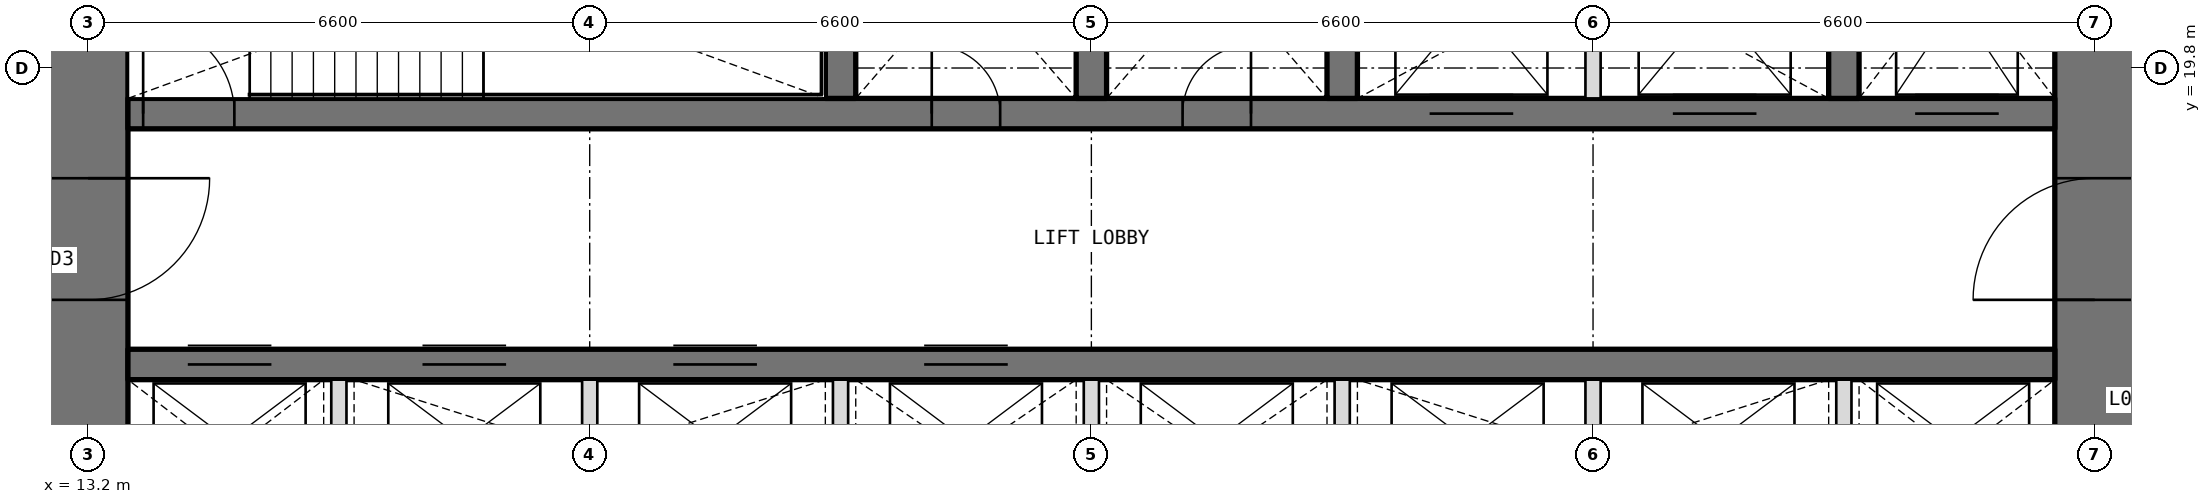
"""IFC4 building model, lengths in metres.
Left out: names, types, materials, properties, quantities, classifications, styles, units other than length and angle.
Written with IfcOpenShell. Run it as: python <this file> out.ifc"""

import sys

from ifc_helpers import new_model, si_unit, direction, frame, frame_2d, origin, place, context, subcontext, project, spatial, rectangle, extrude, element, fill, save


model = new_model("IFC4")
c1 = context("Model", 3, precision=1e-05, world=origin(), true_north=direction((0.0, 1.0)))
c2 = subcontext(c1, "Body", "Model", "MODEL_VIEW")
j1 = project(units=[si_unit("LENGTHUNIT", "METRE"), si_unit("PLANEANGLEUNIT", "RADIAN")], contexts=[c1])
p1 = place(None, origin())
s1 = spatial("IfcSite", under=j1, at=p1, CompositionType="ELEMENT")
p2 = place(p1, origin())
s2 = spatial("IfcBuilding", under=s1, at=p2, CompositionType="ELEMENT")
p3 = place(p2, frame((0.0, 0.0, 17.1)))
s3 = spatial("IfcBuildingStorey", under=s2, at=p3, CompositionType="ELEMENT", Elevation=17.1)
p4 = place(p3, frame((39.6, 13.725, 0.0), z_axis=(0.0, 0.0, 1.0), x_axis=(0.0, 1.0, 0.0)))
e1 = element("IfcWall", 1, at=p4, inside=s3, PredefinedType="SHEAR", context=c2, shape_type="SweptSolid", body=[
    extrude(rectangle(XDim=18.75, YDim=1.05, at=frame_2d((9.375, 0.0))), origin(), (0.0, 0.0, 1.0), 4.2),
])
p5 = place(p4, frame((3.025, 0.0, 0.0)))
e2 = element("IfcOpeningElement", 2, at=p5, cuts=e1, PredefinedType="OPENING", context=c2, shape_type="SweptSolid", body=[
    extrude(rectangle(XDim=1.6, YDim=2.1, at=frame_2d((0.8, 1.05))), frame((0.0, 0.535, 0.0), z_axis=(0.0, -1.0, 0.0), x_axis=(1.0, 0.0, 0.0)), (0.0, 0.0, 1.0), 1.07),
])
p6 = place(p4, frame((13.825, 0.0, 0.0)))
e3 = element("IfcOpeningElement", 3, at=p6, cuts=e1, PredefinedType="OPENING", context=c2, shape_type="SweptSolid", body=[
    extrude(rectangle(XDim=1.6, YDim=2.1, at=frame_2d((0.8, 1.05))), frame((0.0, 0.535, 0.0), z_axis=(0.0, -1.0, 0.0), x_axis=(1.0, 0.0, 0.0)), (0.0, 0.0, 1.0), 1.07),
])
p7 = place(p3, frame((13.2, 32.475, 0.0), z_axis=(0.0, 0.0, 1.0), x_axis=(0.0, -1.0, 0.0)))
e4 = element("IfcWall", 4, at=p7, inside=s3, PredefinedType="SHEAR", context=c2, shape_type="SweptSolid", body=[
    extrude(rectangle(XDim=18.75, YDim=1.05, at=frame_2d((9.375, 0.0))), origin(), (0.0, 0.0, 1.0), 4.2),
])
p8 = place(p7, frame((14.125, 0.0, 0.0)))
e5 = element("IfcOpeningElement", 5, at=p8, cuts=e4, PredefinedType="OPENING", context=c2, shape_type="SweptSolid", body=[
    extrude(rectangle(XDim=1.6, YDim=2.1, at=frame_2d((0.8, 1.05))), frame((0.0, 0.535, 0.0), z_axis=(0.0, -1.0, 0.0), x_axis=(1.0, 0.0, 0.0)), (0.0, 0.0, 1.0), 1.07),
])
p9 = place(p7, frame((3.325, 0.0, 0.0)))
e6 = element("IfcOpeningElement", 6, at=p9, cuts=e4, PredefinedType="OPENING", context=c2, shape_type="SweptSolid", body=[
    extrude(rectangle(XDim=1.6, YDim=2.1, at=frame_2d((0.8, 1.05))), frame((0.0, 0.535, 0.0), z_axis=(0.0, -1.0, 0.0), x_axis=(1.0, 0.0, 0.0)), (0.0, 0.0, 1.0), 1.07),
])
p10 = place(p3, frame((13.725, 15.9, 0.0), z_axis=(0.0, 0.0, 1.0), x_axis=(1.0, 0.0, 0.0)))
e7 = element("IfcWall", 7, at=p10, inside=s3, PredefinedType="SHEAR", context=c2, shape_type="SweptSolid", body=[
    extrude(rectangle(XDim=25.35, YDim=0.4, at=frame_2d((12.675, 0.0))), origin(), (0.0, 0.0, 1.0), 4.2),
])
p11 = place(p10, frame((0.788, 0.0, 0.0)))
e8 = element("IfcOpeningElement", 8, at=p11, cuts=e7, PredefinedType="OPENING", context=c2, shape_type="SweptSolid", body=[
    extrude(rectangle(XDim=1.1, YDim=2.1, at=frame_2d((0.55, 1.05))), frame((0.0, 0.21, 0.0), z_axis=(0.0, -1.0, 0.0), x_axis=(1.0, 0.0, 0.0)), (0.0, 0.0, 1.0), 0.42),
])
p12 = place(p10, frame((3.875, 0.0, 0.0)))
e9 = element("IfcOpeningElement", 9, at=p12, cuts=e7, PredefinedType="OPENING", context=c2, shape_type="SweptSolid", body=[
    extrude(rectangle(XDim=1.1, YDim=2.1, at=frame_2d((0.55, 1.05))), frame((0.0, 0.21, 0.0), z_axis=(0.0, -1.0, 0.0), x_axis=(1.0, 0.0, 0.0)), (0.0, 0.0, 1.0), 0.42),
])
p13 = place(p10, frame((7.175, 0.0, 0.0)))
e10 = element("IfcOpeningElement", 10, at=p13, cuts=e7, PredefinedType="OPENING", context=c2, shape_type="SweptSolid", body=[
    extrude(rectangle(XDim=1.1, YDim=2.1, at=frame_2d((0.55, 1.05))), frame((0.0, 0.21, 0.0), z_axis=(0.0, -1.0, 0.0), x_axis=(1.0, 0.0, 0.0)), (0.0, 0.0, 1.0), 0.42),
])
p14 = place(p10, frame((10.475, 0.0, 0.0)))
e11 = element("IfcOpeningElement", 11, at=p14, cuts=e7, PredefinedType="OPENING", context=c2, shape_type="SweptSolid", body=[
    extrude(rectangle(XDim=1.1, YDim=2.1, at=frame_2d((0.55, 1.05))), frame((0.0, 0.21, 0.0), z_axis=(0.0, -1.0, 0.0), x_axis=(1.0, 0.0, 0.0)), (0.0, 0.0, 1.0), 0.42),
])
p15 = place(p3, frame((13.725, 19.2, 0.0), z_axis=(0.0, 0.0, 1.0), x_axis=(1.0, 0.0, 0.0)))
e12 = element("IfcWall", 12, at=p15, inside=s3, PredefinedType="SHEAR", context=c2, shape_type="SweptSolid", body=[
    extrude(rectangle(XDim=25.35, YDim=0.4, at=frame_2d((12.675, 0.0))), origin(), (0.0, 0.0, 1.0), 4.2),
])
p16 = place(p15, frame((10.575, 0.0, 0.0)))
e13 = element("IfcOpeningElement", 13, at=p16, cuts=e12, PredefinedType="OPENING", context=c2, shape_type="SweptSolid", body=[
    extrude(rectangle(XDim=0.9, YDim=2.1, at=frame_2d((0.45, 1.05))), frame((0.0, 0.21, 0.0), z_axis=(0.0, -1.0, 0.0), x_axis=(1.0, 0.0, 0.0)), (0.0, 0.0, 1.0), 0.42),
])
p17 = place(p15, frame((13.875, 0.0, 0.0)))
e14 = element("IfcOpeningElement", 14, at=p17, cuts=e12, PredefinedType="OPENING", context=c2, shape_type="SweptSolid", body=[
    extrude(rectangle(XDim=0.9, YDim=2.1, at=frame_2d((0.45, 1.05))), frame((0.0, 0.21, 0.0), z_axis=(0.0, -1.0, 0.0), x_axis=(1.0, 0.0, 0.0)), (0.0, 0.0, 1.0), 0.42),
])
p18 = place(p15, frame((0.2, 0.0, 0.0)))
e15 = element("IfcOpeningElement", 15, at=p18, cuts=e12, PredefinedType="OPENING", context=c2, shape_type="SweptSolid", body=[
    extrude(rectangle(XDim=1.2, YDim=2.1, at=frame_2d((0.6, 1.05))), frame((0.0, 0.21, 0.0), z_axis=(0.0, -1.0, 0.0), x_axis=(1.0, 0.0, 0.0)), (0.0, 0.0, 1.0), 0.42),
])
p19 = place(p15, frame((23.512, 0.0, 0.0)))
e16 = element("IfcOpeningElement", 16, at=p19, cuts=e12, PredefinedType="OPENING", context=c2, shape_type="SweptSolid", body=[
    extrude(rectangle(XDim=1.1, YDim=2.1, at=frame_2d((0.55, 1.05))), frame((0.0, 0.21, 0.0), z_axis=(0.0, -1.0, 0.0), x_axis=(1.0, 0.0, 0.0)), (0.0, 0.0, 1.0), 0.42),
])
p20 = place(p15, frame((17.125, 0.0, 0.0)))
e17 = element("IfcOpeningElement", 17, at=p20, cuts=e12, PredefinedType="OPENING", context=c2, shape_type="SweptSolid", body=[
    extrude(rectangle(XDim=1.1, YDim=2.1, at=frame_2d((0.55, 1.05))), frame((0.0, 0.21, 0.0), z_axis=(0.0, -1.0, 0.0), x_axis=(1.0, 0.0, 0.0)), (0.0, 0.0, 1.0), 0.42),
])
p21 = place(p15, frame((20.325, 0.0, 0.0)))
e18 = element("IfcOpeningElement", 18, at=p21, cuts=e12, PredefinedType="OPENING", context=c2, shape_type="SweptSolid", body=[
    extrude(rectangle(XDim=1.1, YDim=2.1, at=frame_2d((0.55, 1.05))), frame((0.0, 0.21, 0.0), z_axis=(0.0, -1.0, 0.0), x_axis=(1.0, 0.0, 0.0)), (0.0, 0.0, 1.0), 0.42),
])
for number, where, z_axis, x_axis in (
    (19, (23.1, 19.4, 0.0), (0.0, 0.0, 1.0), (0.0, 1.0, 0.0)),
    (20, (26.4, 19.4, 0.0), (0.0, 0.0, 1.0), (0.0, 1.0, 0.0)),
    (21, (29.7, 19.4, 0.0), (0.0, 0.0, 1.0), (0.0, 1.0, 0.0)),
    (22, (36.3, 19.4, 0.0), (0.0, 0.0, 1.0), (0.0, 1.0, 0.0)),
):
    element("IfcWall", number, at=place(p3, frame(where, z_axis=z_axis, x_axis=x_axis)), inside=s3, PredefinedType="SHEAR", context=c2, shape_type="SweptSolid", body=[
        extrude(rectangle(XDim=3.35, YDim=0.4, at=frame_2d((1.675, 0.0))), origin(), (0.0, 0.0, 1.0), 4.2),
    ])
for number, where, z_axis, x_axis in (
    (23, (16.5, 13.725, 0.0), (0.0, 0.0, 1.0), (0.0, 1.0, 0.0)),
    (24, (19.8, 13.725, 0.0), (0.0, 0.0, 1.0), (0.0, 1.0, 0.0)),
    (25, (23.1, 13.725, 0.0), (0.0, 0.0, 1.0), (0.0, 1.0, 0.0)),
    (26, (26.4, 13.725, 0.0), (0.0, 0.0, 1.0), (0.0, 1.0, 0.0)),
    (27, (29.7, 13.725, 0.0), (0.0, 0.0, 1.0), (0.0, 1.0, 0.0)),
    (28, (33.0, 13.725, 0.0), (0.0, 0.0, 1.0), (0.0, 1.0, 0.0)),
    (29, (36.3, 13.725, 0.0), (0.0, 0.0, 1.0), (0.0, 1.0, 0.0)),
):
    element("IfcWall", number, at=place(p3, frame(where, z_axis=z_axis, x_axis=x_axis)), inside=s3, PredefinedType="PARTITIONING", context=c2, shape_type="SweptSolid", body=[
        extrude(rectangle(XDim=1.975, YDim=0.2, at=frame_2d((0.987, 0.0))), origin(), (0.0, 0.0, 1.0), 4.2),
    ])
p22 = place(p3, frame((33.0, 19.4, 0.0), z_axis=(0.0, 0.0, 1.0), x_axis=(0.0, 1.0, 0.0)))
e30 = element("IfcWall", 30, at=p22, inside=s3, PredefinedType="PARTITIONING", context=c2, shape_type="SweptSolid", body=[
    extrude(rectangle(XDim=3.35, YDim=0.2, at=frame_2d((1.675, 0.0))), origin(), (0.0, 0.0, 1.0), 4.2),
])
p23 = place(p16, origin())
e31 = element("IfcDoor", 31, at=p23, inside=s3, OperationType="SINGLE_SWING_LEFT", PredefinedType="DOOR", context=c2, shape_type="SweptSolid", body=[
    extrude(rectangle(XDim=0.9, YDim=2.1, at=frame_2d((0.45, 1.05))), frame((0.0, 0.025, 0.0), z_axis=(0.0, -1.0, 0.0), x_axis=(1.0, 0.0, 0.0)), (0.0, 0.0, 1.0), 0.05),
])
fill(e13, e31)
p24 = place(p17, origin())
e32 = element("IfcDoor", 32, at=p24, inside=s3, OperationType="SINGLE_SWING_RIGHT", PredefinedType="DOOR", context=c2, shape_type="SweptSolid", body=[
    extrude(rectangle(XDim=0.9, YDim=2.1, at=frame_2d((0.45, 1.05))), frame((0.0, 0.025, 0.0), z_axis=(0.0, -1.0, 0.0), x_axis=(1.0, 0.0, 0.0)), (0.0, 0.0, 1.0), 0.05),
])
fill(e14, e32)
p25 = place(p18, origin())
e33 = element("IfcDoor", 33, at=p25, inside=s3, OperationType="SINGLE_SWING_LEFT", PredefinedType="DOOR", context=c2, shape_type="SweptSolid", body=[
    extrude(rectangle(XDim=1.2, YDim=2.1, at=frame_2d((0.6, 1.05))), frame((0.0, 0.025, 0.0), z_axis=(0.0, -1.0, 0.0), x_axis=(1.0, 0.0, 0.0)), (0.0, 0.0, 1.0), 0.05),
])
fill(e15, e33)
p26 = place(p8, origin())
e34 = element("IfcDoor", 34, at=p26, inside=s3, OperationType="DOUBLE_DOOR_DOUBLE_SWING", PredefinedType="DOOR", context=c2, shape_type="SweptSolid", body=[
    extrude(rectangle(XDim=1.6, YDim=2.1, at=frame_2d((0.8, 1.05))), frame((0.0, 0.025, 0.0), z_axis=(0.0, -1.0, 0.0), x_axis=(1.0, 0.0, 0.0)), (0.0, 0.0, 1.0), 0.05),
])
fill(e5, e34)
p27 = place(p5, origin())
e35 = element("IfcDoor", 35, at=p27, inside=s3, OperationType="DOUBLE_DOOR_DOUBLE_SWING", PredefinedType="DOOR", context=c2, shape_type="SweptSolid", body=[
    extrude(rectangle(XDim=1.6, YDim=2.1, at=frame_2d((0.8, 1.05))), frame((0.0, 0.025, 0.0), z_axis=(0.0, -1.0, 0.0), x_axis=(1.0, 0.0, 0.0)), (0.0, 0.0, 1.0), 0.05),
])
fill(e2, e35)
p28 = place(p11, origin())
e36 = element("IfcDoor", 36, at=p28, inside=s3, OperationType="DOUBLE_DOOR_SLIDING", PredefinedType="DOOR", context=c2, shape_type="SweptSolid", body=[
    extrude(rectangle(XDim=1.1, YDim=2.1, at=frame_2d((0.55, 1.05))), frame((0.0, 0.025, 0.0), z_axis=(0.0, -1.0, 0.0), x_axis=(1.0, 0.0, 0.0)), (0.0, 0.0, 1.0), 0.05),
])
fill(e8, e36)
p29 = place(p12, origin())
e37 = element("IfcDoor", 37, at=p29, inside=s3, OperationType="DOUBLE_DOOR_SLIDING", PredefinedType="DOOR", context=c2, shape_type="SweptSolid", body=[
    extrude(rectangle(XDim=1.1, YDim=2.1, at=frame_2d((0.55, 1.05))), frame((0.0, 0.025, 0.0), z_axis=(0.0, -1.0, 0.0), x_axis=(1.0, 0.0, 0.0)), (0.0, 0.0, 1.0), 0.05),
])
fill(e9, e37)
p30 = place(p13, origin())
e38 = element("IfcDoor", 38, at=p30, inside=s3, OperationType="DOUBLE_DOOR_SLIDING", PredefinedType="DOOR", context=c2, shape_type="SweptSolid", body=[
    extrude(rectangle(XDim=1.1, YDim=2.1, at=frame_2d((0.55, 1.05))), frame((0.0, 0.025, 0.0), z_axis=(0.0, -1.0, 0.0), x_axis=(1.0, 0.0, 0.0)), (0.0, 0.0, 1.0), 0.05),
])
fill(e10, e38)
p31 = place(p14, origin())
e39 = element("IfcDoor", 39, at=p31, inside=s3, OperationType="DOUBLE_DOOR_SLIDING", PredefinedType="DOOR", context=c2, shape_type="SweptSolid", body=[
    extrude(rectangle(XDim=1.1, YDim=2.1, at=frame_2d((0.55, 1.05))), frame((0.0, 0.025, 0.0), z_axis=(0.0, -1.0, 0.0), x_axis=(1.0, 0.0, 0.0)), (0.0, 0.0, 1.0), 0.05),
])
fill(e11, e39)
p32 = place(p19, origin())
e40 = element("IfcDoor", 40, at=p32, inside=s3, OperationType="DOUBLE_DOOR_SLIDING", PredefinedType="DOOR", context=c2, shape_type="SweptSolid", body=[
    extrude(rectangle(XDim=1.1, YDim=2.1, at=frame_2d((0.55, 1.05))), frame((0.0, 0.025, 0.0), z_axis=(0.0, -1.0, 0.0), x_axis=(1.0, 0.0, 0.0)), (0.0, 0.0, 1.0), 0.05),
])
fill(e16, e40)
p33 = place(p20, origin())
e41 = element("IfcDoor", 41, at=p33, inside=s3, OperationType="DOUBLE_DOOR_SLIDING", PredefinedType="DOOR", context=c2, shape_type="SweptSolid", body=[
    extrude(rectangle(XDim=1.1, YDim=2.1, at=frame_2d((0.55, 1.05))), frame((0.0, 0.025, 0.0), z_axis=(0.0, -1.0, 0.0), x_axis=(1.0, 0.0, 0.0)), (0.0, 0.0, 1.0), 0.05),
])
fill(e17, e41)
p34 = place(p21, origin())
e42 = element("IfcDoor", 42, at=p34, inside=s3, OperationType="DOUBLE_DOOR_SLIDING", PredefinedType="DOOR", context=c2, shape_type="SweptSolid", body=[
    extrude(rectangle(XDim=1.1, YDim=2.1, at=frame_2d((0.55, 1.05))), frame((0.0, 0.025, 0.0), z_axis=(0.0, -1.0, 0.0), x_axis=(1.0, 0.0, 0.0)), (0.0, 0.0, 1.0), 0.05),
])
fill(e18, e42)
save(model, sys.argv[1])
